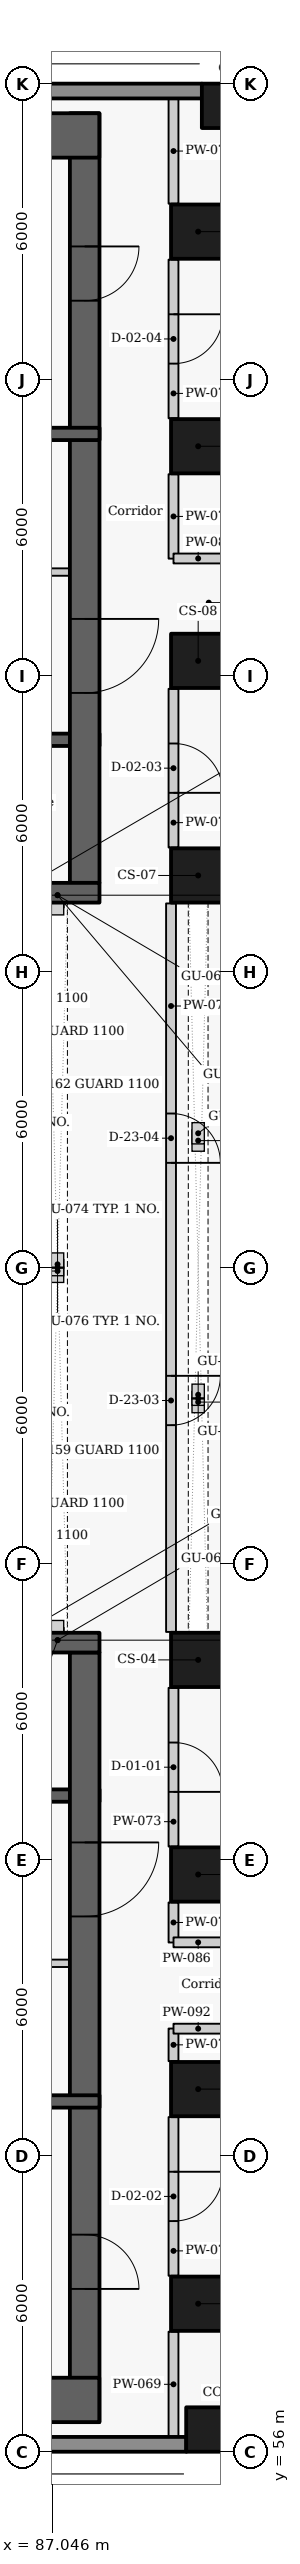
"""IFC4 building model, lengths in metres.
Left out: names, types, materials, properties, quantities, classifications, styles, units other than length and angle.
Written with IfcOpenShell. Run it as: python <this file> out.ifc"""

import sys

from ifc_helpers import new_model, si_unit, direction, frame, frame_2d, origin, origin_2d, place, context, subcontext, project, spatial, rectangle, extrude, element, fill, save


model = new_model("IFC4")
c1 = context("Model", 3, precision=1e-05, world=origin(), true_north=direction((0.0, 1.0)))
c2 = subcontext(c1, "Body", "Model", "MODEL_VIEW")
j1 = project(units=[si_unit("LENGTHUNIT", "METRE"), si_unit("PLANEANGLEUNIT", "RADIAN")], contexts=[c1])
p1 = place(None, origin())
s1 = spatial("IfcSite", under=j1, at=p1, CompositionType="ELEMENT")
p2 = place(p1, origin())
s2 = spatial("IfcBuilding", under=s1, at=p2, CompositionType="ELEMENT")
p3 = place(p2, frame((0.0, 0.0, 38.1)))
s3 = spatial("IfcBuildingStorey", under=s2, at=p3, CompositionType="ELEMENT", Elevation=38.1)
for number, where, z_axis, x_axis in (
    (1, (90.507, 56.45, 0.0), (0.0, 0.0, 1.0), (1.0, 0.0, 0.0)),
    (2, (90.825, 103.55, 0.0), (0.0, 0.0, 1.0), (-1.0, 0.0, 0.0)),
):
    element("IfcColumn", number, at=place(p3, frame(where, z_axis=z_axis, x_axis=x_axis)), inside=s3, PredefinedType="COLUMN", context=c2, shape_type="SweptSolid", body=[
        extrude(rectangle(XDim=1.5, YDim=0.9, at=origin_2d()), origin(), (0.0, 0.0, 1.0), 3.3),
    ])
for number, where, z_axis, x_axis in (
    (3, (90.0, 59.0, 0.0), (0.0, 0.0, 1.0), (0.0, 1.0, 0.0)),
    (4, (90.0, 63.35, 0.0), (0.0, 0.0, 1.0), (0.0, 1.0, 0.0)),
    (5, (90.0, 67.7, 0.0), (0.0, 0.0, 1.0), (0.0, 1.0, 0.0)),
    (6, (90.0, 72.05, 0.0), (0.0, 0.0, 1.0), (0.0, 1.0, 0.0)),
    (7, (90.0, 87.95, 0.0), (0.0, 0.0, 1.0), (0.0, 1.0, 0.0)),
    (8, (90.0, 92.3, 0.0), (0.0, 0.0, 1.0), (0.0, 1.0, 0.0)),
    (9, (90.0, 96.65, 0.0), (0.0, 0.0, 1.0), (0.0, 1.0, 0.0)),
    (10, (90.0, 101.0, 0.0), (0.0, 0.0, 1.0), (0.0, 1.0, 0.0)),
):
    element("IfcColumn", number, at=place(p3, frame(where, z_axis=z_axis, x_axis=x_axis)), inside=s3, PredefinedType="COLUMN", context=c2, shape_type="SweptSolid", body=[
        extrude(rectangle(XDim=1.1, YDim=1.1, at=origin_2d()), origin(), (0.0, 0.0, 1.0), 3.3),
    ])
p4 = place(p3, frame((90.079, 103.85, 0.0), z_axis=(0.0, 0.0, 1.0), x_axis=(-1.0, 0.0, 0.0)))
e11 = element("IfcWall", 11, at=p4, inside=s3, PredefinedType="SOLIDWALL", context=c2, shape_type="SweptSolid", body=[
    extrude(rectangle(XDim=20.19, YDim=0.3, at=frame_2d((10.095, 0.0))), origin(), (0.0, 0.0, 1.0), 2.425),
])
p5 = place(p3, frame((69.921, 56.15, 0.0), z_axis=(0.0, 0.0, 1.0), x_axis=(1.0, 0.0, 0.0)))
e12 = element("IfcWall", 12, at=p5, inside=s3, PredefinedType="SOLIDWALL", context=c2, shape_type="SweptSolid", body=[
    extrude(rectangle(XDim=19.84, YDim=0.3, at=frame_2d((9.92, 0.0))), origin(), (0.0, 0.0, 1.0), 2.425),
])
p6 = place(p3, frame((88.0, 90.7, -0.4), z_axis=(0.0, 0.0, 1.0), x_axis=(-1.0, 0.0, 0.0)))
e13 = element("IfcWall", 13, at=p6, inside=s3, PredefinedType="SHEAR", context=c2, shape_type="SweptSolid", body=[
    extrude(rectangle(XDim=2.6, YDim=0.25, at=frame_2d((1.3, 0.0))), origin(), (0.0, 0.0, 1.0), 3.425),
])
p7 = place(p6, frame((1.175, 0.0, 0.4)))
e14 = element("IfcOpeningElement", 14, at=p7, cuts=e13, PredefinedType="OPENING", context=c2, shape_type="SweptSolid", body=[
    extrude(rectangle(XDim=0.9, YDim=2.1, at=frame_2d((0.45, 1.05))), frame((0.0, 0.135, 0.0), z_axis=(0.0, -1.0, 0.0), x_axis=(1.0, 0.0, 0.0)), (0.0, 0.0, 1.0), 0.27),
])
p8 = place(p3, frame((87.7, 103.4, -0.4), z_axis=(0.0, 0.0, 1.0), x_axis=(0.0, -1.0, 0.0)))
e15 = element("IfcWall", 15, at=p8, inside=s3, PredefinedType="SHEAR", context=c2, shape_type="SweptSolid", body=[
    extrude(rectangle(XDim=15.6, YDim=0.6, at=frame_2d((7.8, 0.0))), origin(), (0.0, 0.0, 1.0), 3.425),
])
p9 = place(p8, frame((10.25, 0.0, 0.4)))
e16 = element("IfcOpeningElement", 16, at=p9, cuts=e15, PredefinedType="OPENING", context=c2, shape_type="SweptSolid", body=[
    extrude(rectangle(XDim=1.5, YDim=2.1, at=frame_2d((0.75, 1.05))), frame((0.0, 0.31, 0.0), z_axis=(0.0, -1.0, 0.0), x_axis=(1.0, 0.0, 0.0)), (0.0, 0.0, 1.0), 0.62),
])
p10 = place(p8, frame((2.7, 0.0, 0.4)))
e17 = element("IfcOpeningElement", 17, at=p10, cuts=e15, PredefinedType="OPENING", context=c2, shape_type="SweptSolid", body=[
    extrude(rectangle(XDim=1.1, YDim=2.1, at=frame_2d((0.55, 1.05))), frame((0.0, 0.31, 0.0), z_axis=(0.0, -1.0, 0.0), x_axis=(1.0, 0.0, 0.0)), (0.0, 0.0, 1.0), 0.62),
])
p11 = place(p3, frame((85.397, 94.1, 0.0), z_axis=(0.0, 0.0, 1.0), x_axis=(1.0, 0.0, 0.0)))
e18 = element("IfcWall", 18, at=p11, inside=s3, PredefinedType="PARTITIONING", context=c2, shape_type="SweptSolid", body=[
    extrude(rectangle(XDim=2.603, YDim=0.15, at=frame_2d((1.302, 0.0))), origin(), (0.0, 0.0, 1.0), 3.025),
])
p12 = place(p11, frame((0.528, 0.0, 0.0)))
e19 = element("IfcOpeningElement", 19, at=p12, cuts=e18, PredefinedType="OPENING", context=c2, shape_type="SweptSolid", body=[
    extrude(rectangle(XDim=0.9, YDim=2.1, at=frame_2d((0.45, 1.05))), frame((0.0, 0.085, 0.0), z_axis=(0.0, -1.0, 0.0), x_axis=(1.0, 0.0, 0.0)), (0.0, 0.0, 1.0), 0.17),
])
p13 = place(p3, frame((80.0, 96.9, -0.4), z_axis=(0.0, 0.0, 1.0), x_axis=(1.0, 0.0, 0.0)))
e20 = element("IfcWall", 20, at=p13, inside=s3, PredefinedType="SHEAR", context=c2, shape_type="SweptSolid", body=[
    extrude(rectangle(XDim=8.0, YDim=0.25, at=frame_2d((4.0, 0.0))), origin(), (0.0, 0.0, 1.0), 3.425),
])
p14 = place(p13, frame((3.849, 0.0, 0.4)))
e21 = element("IfcOpeningElement", 21, at=p14, cuts=e20, PredefinedType="OPENING", context=c2, shape_type="SweptSolid", body=[
    extrude(rectangle(XDim=1.1, YDim=2.1, at=frame_2d((0.55, 1.05))), frame((0.0, 0.135, 0.0), z_axis=(0.0, -1.0, 0.0), x_axis=(1.0, 0.0, 0.0)), (0.0, 0.0, 1.0), 0.27),
])
p15 = place(p3, frame((85.4, 69.3, -0.4), z_axis=(0.0, 0.0, 1.0), x_axis=(1.0, 0.0, 0.0)))
e22 = element("IfcWall", 22, at=p15, inside=s3, PredefinedType="SHEAR", context=c2, shape_type="SweptSolid", body=[
    extrude(rectangle(XDim=2.6, YDim=0.25, at=frame_2d((1.3, 0.0))), origin(), (0.0, 0.0, 1.0), 3.425),
])
p16 = place(p15, frame((0.525, 0.0, 0.4)))
e23 = element("IfcOpeningElement", 23, at=p16, cuts=e22, PredefinedType="OPENING", context=c2, shape_type="SweptSolid", body=[
    extrude(rectangle(XDim=0.9, YDim=2.1, at=frame_2d((0.45, 1.05))), frame((0.0, 0.135, 0.0), z_axis=(0.0, -1.0, 0.0), x_axis=(1.0, 0.0, 0.0)), (0.0, 0.0, 1.0), 0.27),
])
p17 = place(p3, frame((87.7, 72.2, -0.4), z_axis=(0.0, 0.0, 1.0), x_axis=(0.0, -1.0, 0.0)))
e24 = element("IfcWall", 24, at=p17, inside=s3, PredefinedType="SHEAR", context=c2, shape_type="SweptSolid", body=[
    extrude(rectangle(XDim=15.6, YDim=0.6, at=frame_2d((7.8, 0.0))), origin(), (0.0, 0.0, 1.0), 3.425),
])
p18 = place(p17, frame((3.85, 0.0, 0.4)))
e25 = element("IfcOpeningElement", 25, at=p18, cuts=e24, PredefinedType="OPENING", context=c2, shape_type="SweptSolid", body=[
    extrude(rectangle(XDim=1.5, YDim=2.1, at=frame_2d((0.75, 1.05))), frame((0.0, 0.31, 0.0), z_axis=(0.0, -1.0, 0.0), x_axis=(1.0, 0.0, 0.0)), (0.0, 0.0, 1.0), 0.62),
])
p19 = place(p17, frame((11.8, 0.0, 0.4)))
e26 = element("IfcOpeningElement", 26, at=p19, cuts=e24, PredefinedType="OPENING", context=c2, shape_type="SweptSolid", body=[
    extrude(rectangle(XDim=1.1, YDim=2.1, at=frame_2d((0.55, 1.05))), frame((0.0, 0.31, 0.0), z_axis=(0.0, -1.0, 0.0), x_axis=(1.0, 0.0, 0.0)), (0.0, 0.0, 1.0), 0.62),
])
p20 = place(p3, frame((88.0, 65.9, 0.0), z_axis=(0.0, 0.0, 1.0), x_axis=(-1.0, 0.0, 0.0)))
e27 = element("IfcWall", 27, at=p20, inside=s3, PredefinedType="PARTITIONING", context=c2, shape_type="SweptSolid", body=[
    extrude(rectangle(XDim=2.603, YDim=0.15, at=frame_2d((1.302, 0.0))), origin(), (0.0, 0.0, 1.0), 3.025),
])
p21 = place(p20, frame((1.175, 0.0, 0.0)))
e28 = element("IfcOpeningElement", 28, at=p21, cuts=e27, PredefinedType="OPENING", context=c2, shape_type="SweptSolid", body=[
    extrude(rectangle(XDim=0.9, YDim=2.1, at=frame_2d((0.45, 1.05))), frame((0.0, 0.085, 0.0), z_axis=(0.0, -1.0, 0.0), x_axis=(1.0, 0.0, 0.0)), (0.0, 0.0, 1.0), 0.17),
])
p22 = place(p3, frame((80.0, 63.1, -0.4), z_axis=(0.0, 0.0, 1.0), x_axis=(1.0, 0.0, 0.0)))
e29 = element("IfcWall", 29, at=p22, inside=s3, PredefinedType="SHEAR", context=c2, shape_type="SweptSolid", body=[
    extrude(rectangle(XDim=8.0, YDim=0.25, at=frame_2d((4.0, 0.0))), origin(), (0.0, 0.0, 1.0), 3.425),
])
p23 = place(p22, frame((3.849, 0.0, 0.4)))
e30 = element("IfcOpeningElement", 30, at=p23, cuts=e29, PredefinedType="OPENING", context=c2, shape_type="SweptSolid", body=[
    extrude(rectangle(XDim=1.1, YDim=2.1, at=frame_2d((0.55, 1.05))), frame((0.0, 0.135, 0.0), z_axis=(0.0, -1.0, 0.0), x_axis=(1.0, 0.0, 0.0)), (0.0, 0.0, 1.0), 0.27),
])
p24 = place(p3, frame((89.5, 56.3, 0.0), z_axis=(0.0, 0.0, 1.0), x_axis=(0.0, 1.0, 0.0)))
e31 = element("IfcWall", 31, at=p24, inside=s3, PredefinedType="PARTITIONING", context=c2, shape_type="SweptSolid", body=[
    extrude(rectangle(XDim=2.133, YDim=0.2, at=frame_2d((1.066, 0.0))), origin(), (0.0, 0.0, 1.0), 3.025),
])
p25 = place(p3, frame((89.5, 62.783, 0.0), z_axis=(0.0, 0.0, 1.0), x_axis=(0.0, -1.0, 0.0)))
e32 = element("IfcWall", 32, at=p25, inside=s3, PredefinedType="PARTITIONING", context=c2, shape_type="SweptSolid", body=[
    extrude(rectangle(XDim=3.216, YDim=0.2, at=frame_2d((1.608, 0.0))), origin(), (0.0, 0.0, 1.0), 3.025),
])
p26 = place(p25, frame((1.108, 0.0, 0.0)))
e33 = element("IfcOpeningElement", 33, at=p26, cuts=e32, PredefinedType="OPENING", context=c2, shape_type="SweptSolid", body=[
    extrude(rectangle(XDim=1.0, YDim=2.1, at=frame_2d((0.5, 1.05))), frame((0.0, 0.11, 0.0), z_axis=(0.0, -1.0, 0.0), x_axis=(1.0, 0.0, 0.0)), (0.0, 0.0, 1.0), 0.22),
])
p27 = place(p3, frame((89.5, 63.917, 0.0), z_axis=(0.0, 0.0, 1.0), x_axis=(0.0, 1.0, 0.0)))
e34 = element("IfcWall", 34, at=p27, inside=s3, PredefinedType="PARTITIONING", context=c2, shape_type="SweptSolid", body=[
    extrude(rectangle(XDim=0.661, YDim=0.2, at=frame_2d((0.331, 0.0))), origin(), (0.0, 0.0, 1.0), 3.025),
])
p28 = place(p3, frame((89.5, 66.322, 0.0), z_axis=(0.0, 0.0, 1.0), x_axis=(0.0, 1.0, 0.0)))
e35 = element("IfcWall", 35, at=p28, inside=s3, PredefinedType="PARTITIONING", context=c2, shape_type="SweptSolid", body=[
    extrude(rectangle(XDim=0.811, YDim=0.2, at=frame_2d((0.406, 0.0))), origin(), (0.0, 0.0, 1.0), 3.025),
])
p29 = place(p3, frame((89.5, 71.483, 0.0), z_axis=(0.0, 0.0, 1.0), x_axis=(0.0, -1.0, 0.0)))
e36 = element("IfcWall", 36, at=p29, inside=s3, PredefinedType="PARTITIONING", context=c2, shape_type="SweptSolid", body=[
    extrude(rectangle(XDim=3.216, YDim=0.2, at=frame_2d((1.608, 0.0))), origin(), (0.0, 0.0, 1.0), 3.025),
])
p30 = place(p29, frame((1.108, 0.0, 0.0)))
e37 = element("IfcOpeningElement", 37, at=p30, cuts=e36, PredefinedType="OPENING", context=c2, shape_type="SweptSolid", body=[
    extrude(rectangle(XDim=1.0, YDim=2.1, at=frame_2d((0.5, 1.05))), frame((0.0, 0.11, 0.0), z_axis=(0.0, -1.0, 0.0), x_axis=(1.0, 0.0, 0.0)), (0.0, 0.0, 1.0), 0.22),
])
p31 = place(p3, frame((89.5, 91.733, 0.0), z_axis=(0.0, 0.0, 1.0), x_axis=(0.0, -1.0, 0.0)))
e38 = element("IfcWall", 38, at=p31, inside=s3, PredefinedType="PARTITIONING", context=c2, shape_type="SweptSolid", body=[
    extrude(rectangle(XDim=3.216, YDim=0.2, at=frame_2d((1.608, 0.0))), origin(), (0.0, 0.0, 1.0), 3.025),
])
p32 = place(p31, frame((1.108, 0.0, 0.0)))
e39 = element("IfcOpeningElement", 39, at=p32, cuts=e38, PredefinedType="OPENING", context=c2, shape_type="SweptSolid", body=[
    extrude(rectangle(XDim=1.0, YDim=2.1, at=frame_2d((0.5, 1.05))), frame((0.0, 0.11, 0.0), z_axis=(0.0, -1.0, 0.0), x_axis=(1.0, 0.0, 0.0)), (0.0, 0.0, 1.0), 0.22),
])
p33 = place(p3, frame((89.5, 94.372, 0.0), z_axis=(0.0, 0.0, 1.0), x_axis=(0.0, 1.0, 0.0)))
e40 = element("IfcWall", 40, at=p33, inside=s3, PredefinedType="PARTITIONING", context=c2, shape_type="SweptSolid", body=[
    extrude(rectangle(XDim=1.711, YDim=0.2, at=frame_2d((0.855, 0.0))), origin(), (0.0, 0.0, 1.0), 3.025),
])
p34 = place(p3, frame((89.5, 100.433, 0.0), z_axis=(0.0, 0.0, 1.0), x_axis=(0.0, -1.0, 0.0)))
e41 = element("IfcWall", 41, at=p34, inside=s3, PredefinedType="PARTITIONING", context=c2, shape_type="SweptSolid", body=[
    extrude(rectangle(XDim=3.216, YDim=0.2, at=frame_2d((1.608, 0.0))), origin(), (0.0, 0.0, 1.0), 3.025),
])
p35 = place(p34, frame((1.108, 0.0, 0.0)))
e42 = element("IfcOpeningElement", 42, at=p35, cuts=e41, PredefinedType="OPENING", context=c2, shape_type="SweptSolid", body=[
    extrude(rectangle(XDim=1.0, YDim=2.1, at=frame_2d((0.5, 1.05))), frame((0.0, 0.11, 0.0), z_axis=(0.0, -1.0, 0.0), x_axis=(1.0, 0.0, 0.0)), (0.0, 0.0, 1.0), 0.22),
])
p36 = place(p3, frame((89.5, 101.567, 0.0), z_axis=(0.0, 0.0, 1.0), x_axis=(0.0, 1.0, 0.0)))
e43 = element("IfcWall", 43, at=p36, inside=s3, PredefinedType="PARTITIONING", context=c2, shape_type="SweptSolid", body=[
    extrude(rectangle(XDim=2.133, YDim=0.2, at=frame_2d((1.066, 0.0))), origin(), (0.0, 0.0, 1.0), 3.025),
])
p37 = place(p3, frame((89.45, 87.383, 0.0), z_axis=(0.0, 0.0, 1.0), x_axis=(0.0, -1.0, 0.0)))
e44 = element("IfcWall", 44, at=p37, inside=s3, PredefinedType="PARTITIONING", context=c2, shape_type="SweptSolid", body=[
    extrude(rectangle(XDim=14.766, YDim=0.2, at=frame_2d((7.383, 0.0))), origin(), (0.0, 0.0, 1.0), 3.025),
])
p38 = place(p37, frame((9.575, 0.0, 0.0)))
e45 = element("IfcOpeningElement", 45, at=p38, cuts=e44, PredefinedType="OPENING", context=c2, shape_type="SweptSolid", body=[
    extrude(rectangle(XDim=1.0, YDim=2.1, at=frame_2d((0.5, 1.05))), frame((0.0, 0.11, 0.0), z_axis=(0.0, -1.0, 0.0), x_axis=(1.0, 0.0, 0.0)), (0.0, 0.0, 1.0), 0.22),
])
p39 = place(p37, frame((4.258, 0.0, 0.0)))
e46 = element("IfcOpeningElement", 46, at=p39, cuts=e44, PredefinedType="OPENING", context=c2, shape_type="SweptSolid", body=[
    extrude(rectangle(XDim=1.0, YDim=2.1, at=frame_2d((0.5, 1.05))), frame((0.0, 0.11, 0.0), z_axis=(0.0, -1.0, 0.0), x_axis=(1.0, 0.0, 0.0)), (0.0, 0.0, 1.0), 0.22),
])
for number, where, z_axis, x_axis in (
    (47, (89.5, 94.375, 0.0), (0.0, 0.0, 1.0), (1.0, 0.0, 0.0)),
    (48, (89.5, 66.325, 0.0), (0.0, 0.0, 1.0), (1.0, 0.0, 0.0)),
    (49, (89.5, 64.575, 0.0), (0.0, 0.0, 1.0), (1.0, 0.0, 0.0)),
):
    element("IfcWall", number, at=place(p3, frame(where, z_axis=z_axis, x_axis=x_axis)), inside=s3, PredefinedType="PARTITIONING", context=c2, shape_type="SweptSolid", body=[
        extrude(rectangle(XDim=1.0, YDim=0.2, at=frame_2d((0.5, 0.0))), origin(), (0.0, 0.0, 1.0), 2.505),
    ])
p40 = place(p3, frame((72.0, 87.6, -0.4), z_axis=(0.0, 0.0, 1.0), x_axis=(1.0, 0.0, 0.0)))
e50 = element("IfcWall", 50, at=p40, inside=s3, PredefinedType="SHEAR", context=c2, shape_type="SweptSolid", body=[
    extrude(rectangle(XDim=16.0, YDim=0.4, at=frame_2d((8.0, 0.0))), origin(), (0.0, 0.0, 1.0), 3.425),
])
p41 = place(p3, frame((72.004, 102.95, -0.4), z_axis=(0.0, 0.0, 1.0), x_axis=(1.0, 0.0, 0.0)))
e51 = element("IfcWall", 51, at=p41, inside=s3, PredefinedType="SHEAR", context=c2, shape_type="SweptSolid", body=[
    extrude(rectangle(XDim=15.992, YDim=0.9, at=frame_2d((7.996, 0.0))), origin(), (0.0, 0.0, 1.0), 3.425),
])
p42 = place(p3, frame((72.0, 72.4, -0.4), z_axis=(0.0, 0.0, 1.0), x_axis=(1.0, 0.0, 0.0)))
e52 = element("IfcWall", 52, at=p42, inside=s3, PredefinedType="SHEAR", context=c2, shape_type="SweptSolid", body=[
    extrude(rectangle(XDim=16.0, YDim=0.4, at=frame_2d((8.0, 0.0))), origin(), (0.0, 0.0, 1.0), 3.425),
])
p43 = place(p3, frame((72.004, 57.05, -0.4), z_axis=(0.0, 0.0, 1.0), x_axis=(1.0, 0.0, 0.0)))
e53 = element("IfcWall", 53, at=p43, inside=s3, PredefinedType="SHEAR", context=c2, shape_type="SweptSolid", body=[
    extrude(rectangle(XDim=15.992, YDim=0.9, at=frame_2d((7.996, 0.0))), origin(), (0.0, 0.0, 1.0), 3.425),
])
p44 = place(p30, origin())
e54 = element("IfcDoor", 54, at=p44, inside=s3, OperationType="SINGLE_SWING_RIGHT", PredefinedType="DOOR", context=c2, shape_type="SweptSolid", body=[
    extrude(rectangle(XDim=1.0, YDim=2.1, at=frame_2d((0.5, 1.05))), frame((0.0, 0.025, 0.0), z_axis=(0.0, -1.0, 0.0), x_axis=(1.0, 0.0, 0.0)), (0.0, 0.0, 1.0), 0.05),
])
fill(e37, e54)
p45 = place(p26, origin())
e55 = element("IfcDoor", 55, at=p45, inside=s3, OperationType="SINGLE_SWING_LEFT", PredefinedType="DOOR", context=c2, shape_type="SweptSolid", body=[
    extrude(rectangle(XDim=1.0, YDim=2.1, at=frame_2d((0.5, 1.05))), frame((0.0, 0.025, 0.0), z_axis=(0.0, -1.0, 0.0), x_axis=(1.0, 0.0, 0.0)), (0.0, 0.0, 1.0), 0.05),
])
fill(e33, e55)
p46 = place(p32, origin())
e56 = element("IfcDoor", 56, at=p46, inside=s3, OperationType="SINGLE_SWING_RIGHT", PredefinedType="DOOR", context=c2, shape_type="SweptSolid", body=[
    extrude(rectangle(XDim=1.0, YDim=2.1, at=frame_2d((0.5, 1.05))), frame((0.0, 0.025, 0.0), z_axis=(0.0, -1.0, 0.0), x_axis=(1.0, 0.0, 0.0)), (0.0, 0.0, 1.0), 0.05),
])
fill(e39, e56)
p47 = place(p35, origin())
e57 = element("IfcDoor", 57, at=p47, inside=s3, OperationType="SINGLE_SWING_LEFT", PredefinedType="DOOR", context=c2, shape_type="SweptSolid", body=[
    extrude(rectangle(XDim=1.0, YDim=2.1, at=frame_2d((0.5, 1.05))), frame((0.0, 0.025, 0.0), z_axis=(0.0, -1.0, 0.0), x_axis=(1.0, 0.0, 0.0)), (0.0, 0.0, 1.0), 0.05),
])
fill(e42, e57)
p48 = place(p38, origin())
e58 = element("IfcDoor", 58, at=p48, inside=s3, OperationType="SINGLE_SWING_LEFT", PredefinedType="DOOR", context=c2, shape_type="SweptSolid", body=[
    extrude(rectangle(XDim=1.0, YDim=2.1, at=frame_2d((0.5, 1.05))), frame((0.0, 0.025, 0.0), z_axis=(0.0, -1.0, 0.0), x_axis=(1.0, 0.0, 0.0)), (0.0, 0.0, 1.0), 0.05),
])
fill(e45, e58)
p49 = place(p39, origin())
e59 = element("IfcDoor", 59, at=p49, inside=s3, OperationType="SINGLE_SWING_RIGHT", PredefinedType="DOOR", context=c2, shape_type="SweptSolid", body=[
    extrude(rectangle(XDim=1.0, YDim=2.1, at=frame_2d((0.5, 1.05))), frame((0.0, 0.025, 0.0), z_axis=(0.0, -1.0, 0.0), x_axis=(1.0, 0.0, 0.0)), (0.0, 0.0, 1.0), 0.05),
])
fill(e46, e59)
p50 = place(p9, origin())
e60 = element("IfcDoor", 60, at=p50, inside=s3, OperationType="DOUBLE_DOOR_SINGLE_SWING", PredefinedType="DOOR", context=c2, shape_type="SweptSolid", body=[
    extrude(rectangle(XDim=1.5, YDim=2.1, at=frame_2d((0.75, 1.05))), frame((0.0, 0.025, 0.0), z_axis=(0.0, -1.0, 0.0), x_axis=(1.0, 0.0, 0.0)), (0.0, 0.0, 1.0), 0.05),
])
fill(e16, e60)
p51 = place(p10, origin())
e61 = element("IfcDoor", 61, at=p51, inside=s3, OperationType="SINGLE_SWING_LEFT", PredefinedType="DOOR", context=c2, shape_type="SweptSolid", body=[
    extrude(rectangle(XDim=1.1, YDim=2.1, at=frame_2d((0.55, 1.05))), frame((0.0, 0.025, 0.0), z_axis=(0.0, -1.0, 0.0), x_axis=(1.0, 0.0, 0.0)), (0.0, 0.0, 1.0), 0.05),
])
fill(e17, e61)
p52 = place(p18, origin())
e62 = element("IfcDoor", 62, at=p52, inside=s3, OperationType="DOUBLE_DOOR_SINGLE_SWING", PredefinedType="DOOR", context=c2, shape_type="SweptSolid", body=[
    extrude(rectangle(XDim=1.5, YDim=2.1, at=frame_2d((0.75, 1.05))), frame((0.0, 0.025, 0.0), z_axis=(0.0, -1.0, 0.0), x_axis=(1.0, 0.0, 0.0)), (0.0, 0.0, 1.0), 0.05),
])
fill(e25, e62)
p53 = place(p19, origin())
e63 = element("IfcDoor", 63, at=p53, inside=s3, OperationType="SINGLE_SWING_RIGHT", PredefinedType="DOOR", context=c2, shape_type="SweptSolid", body=[
    extrude(rectangle(XDim=1.1, YDim=2.1, at=frame_2d((0.55, 1.05))), frame((0.0, 0.025, 0.0), z_axis=(0.0, -1.0, 0.0), x_axis=(1.0, 0.0, 0.0)), (0.0, 0.0, 1.0), 0.05),
])
fill(e26, e63)
save(model, sys.argv[1])
